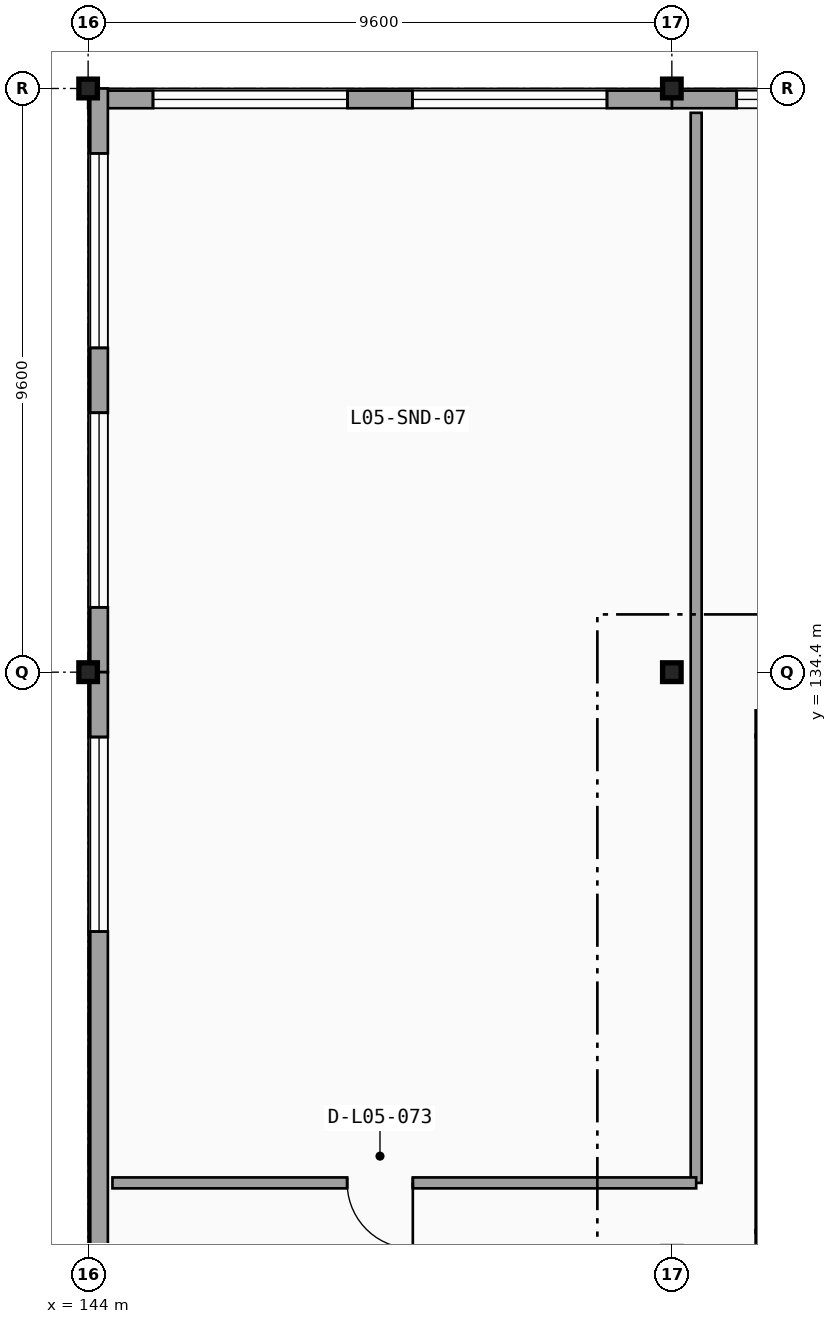
"""IFC4 building model, lengths in metres.
Left out: names, types, materials, properties, quantities, classifications, styles, units other than length and angle.
Written with IfcOpenShell. Run it as: python <this file> out.ifc"""

import sys

from ifc_helpers import new_model, si_unit, direction, frame, frame_2d, origin, origin_2d, place, context, subcontext, project, spatial, rectangle, i_section, extrude, element, fill, save


model = new_model("IFC4")
c1 = context("Model", 3, precision=1e-05, world=origin(), true_north=direction((0.0, 1.0)))
c2 = subcontext(c1, "Body", "Model", "MODEL_VIEW")
j1 = project(units=[si_unit("LENGTHUNIT", "METRE"), si_unit("PLANEANGLEUNIT", "RADIAN")], contexts=[c1])
p1 = place(None, origin())
s1 = spatial("IfcSite", under=j1, at=p1, CompositionType="ELEMENT")
p2 = place(p1, origin())
s2 = spatial("IfcBuilding", under=s1, at=p2, CompositionType="ELEMENT")
p3 = place(p2, frame((0.0, 0.0, 23.1)))
s3 = spatial("IfcBuildingStorey", under=s2, at=p3, CompositionType="ELEMENT", Elevation=23.1)
for number, where, z_axis, x_axis in (
    (1, (144.0, 134.4, 0.0), (0.0, 0.0, 1.0), (1.0, 0.0, 0.0)),
    (2, (144.0, 144.0, 0.0), (0.0, 0.0, 1.0), (1.0, 0.0, 0.0)),
    (3, (153.6, 134.4, 0.0), (0.0, 0.0, 1.0), (1.0, 0.0, 0.0)),
    (4, (153.6, 144.0, 0.0), (0.0, 0.0, 1.0), (1.0, 0.0, 0.0)),
):
    element("IfcColumn", number, at=place(p3, frame(where, z_axis=z_axis, x_axis=x_axis)), inside=s3, PredefinedType="COLUMN", context=c2, shape_type="SweptSolid", body=[
        extrude(i_section(OverallWidth=0.305, OverallDepth=0.308, WebThickness=0.01, FlangeThickness=0.015, FilletRadius=0.013, at=origin_2d()), origin(), (0.0, 0.0, 1.0), 5.1),
    ])
p4 = place(p3, frame((163.2, 143.82, 0.0), z_axis=(0.0, 0.0, 1.0), x_axis=(-1.0, 0.0, 0.0)))
e5 = element("IfcWall", 5, at=p4, inside=s3, PredefinedType="SOLIDWALL", context=c2, shape_type="SweptSolid", body=[
    extrude(rectangle(XDim=9.6, YDim=0.29, at=frame_2d((4.8, 0.0))), origin(), (0.0, 0.0, 1.0), 3.893),
])
p5 = place(p4, frame((4.267, 0.0, 0.95), z_axis=(0.0, 0.0, 1.0), x_axis=(-1.0, 0.0, 0.0)))
e6 = element("IfcOpeningElement", 6, at=p5, cuts=e5, PredefinedType="OPENING", context=c2, shape_type="SweptSolid", body=[
    extrude(rectangle(XDim=3.2, YDim=2.2, at=frame_2d((1.6, 1.1))), frame((0.0, 0.155, 0.0), z_axis=(0.0, -1.0, 0.0), x_axis=(1.0, 0.0, 0.0)), (0.0, 0.0, 1.0), 0.31),
])
p6 = place(p4, frame((8.533, 0.0, 0.95), z_axis=(0.0, 0.0, 1.0), x_axis=(-1.0, 0.0, 0.0)))
e7 = element("IfcOpeningElement", 7, at=p6, cuts=e5, PredefinedType="OPENING", context=c2, shape_type="SweptSolid", body=[
    extrude(rectangle(XDim=3.2, YDim=2.2, at=frame_2d((1.6, 1.1))), frame((0.0, 0.155, 0.0), z_axis=(0.0, -1.0, 0.0), x_axis=(1.0, 0.0, 0.0)), (0.0, 0.0, 1.0), 0.31),
])
p7 = place(p3, frame((153.6, 143.82, 0.0), z_axis=(0.0, 0.0, 1.0), x_axis=(-1.0, 0.0, 0.0)))
e8 = element("IfcWall", 8, at=p7, inside=s3, PredefinedType="SOLIDWALL", context=c2, shape_type="SweptSolid", body=[
    extrude(rectangle(XDim=9.6, YDim=0.29, at=frame_2d((4.8, 0.0))), origin(), (0.0, 0.0, 1.0), 3.906),
])
p8 = place(p7, frame((4.267, 0.0, 0.95), z_axis=(0.0, 0.0, 1.0), x_axis=(-1.0, 0.0, 0.0)))
e9 = element("IfcOpeningElement", 9, at=p8, cuts=e8, PredefinedType="OPENING", context=c2, shape_type="SweptSolid", body=[
    extrude(rectangle(XDim=3.2, YDim=2.2, at=frame_2d((1.6, 1.1))), frame((0.0, 0.155, 0.0), z_axis=(0.0, -1.0, 0.0), x_axis=(1.0, 0.0, 0.0)), (0.0, 0.0, 1.0), 0.31),
])
p9 = place(p7, frame((8.533, 0.0, 0.95), z_axis=(0.0, 0.0, 1.0), x_axis=(-1.0, 0.0, 0.0)))
e10 = element("IfcOpeningElement", 10, at=p9, cuts=e8, PredefinedType="OPENING", context=c2, shape_type="SweptSolid", body=[
    extrude(rectangle(XDim=3.2, YDim=2.2, at=frame_2d((1.6, 1.1))), frame((0.0, 0.155, 0.0), z_axis=(0.0, -1.0, 0.0), x_axis=(1.0, 0.0, 0.0)), (0.0, 0.0, 1.0), 0.31),
])
p10 = place(p3, frame((144.18, 144.0, 0.0), z_axis=(0.0, 0.0, 1.0), x_axis=(0.0, -1.0, 0.0)))
e11 = element("IfcWall", 11, at=p10, inside=s3, PredefinedType="SOLIDWALL", context=c2, shape_type="SweptSolid", body=[
    extrude(rectangle(XDim=9.6, YDim=0.29, at=frame_2d((4.8, 0.0))), origin(), (0.0, 0.0, 1.0), 3.906),
])
p11 = place(p10, frame((4.267, 0.0, 0.95), z_axis=(0.0, 0.0, 1.0), x_axis=(-1.0, 0.0, 0.0)))
e12 = element("IfcOpeningElement", 12, at=p11, cuts=e11, PredefinedType="OPENING", context=c2, shape_type="SweptSolid", body=[
    extrude(rectangle(XDim=3.2, YDim=2.2, at=frame_2d((1.6, 1.1))), frame((0.0, 0.155, 0.0), z_axis=(0.0, -1.0, 0.0), x_axis=(1.0, 0.0, 0.0)), (0.0, 0.0, 1.0), 0.31),
])
p12 = place(p10, frame((8.533, 0.0, 0.95), z_axis=(0.0, 0.0, 1.0), x_axis=(-1.0, 0.0, 0.0)))
e13 = element("IfcOpeningElement", 13, at=p12, cuts=e11, PredefinedType="OPENING", context=c2, shape_type="SweptSolid", body=[
    extrude(rectangle(XDim=3.2, YDim=2.2, at=frame_2d((1.6, 1.1))), frame((0.0, 0.155, 0.0), z_axis=(0.0, -1.0, 0.0), x_axis=(1.0, 0.0, 0.0)), (0.0, 0.0, 1.0), 0.31),
])
p13 = place(p3, frame((144.18, 134.4, 0.0), z_axis=(0.0, 0.0, 1.0), x_axis=(0.0, -1.0, 0.0)))
e14 = element("IfcWall", 14, at=p13, inside=s3, PredefinedType="SOLIDWALL", context=c2, shape_type="SweptSolid", body=[
    extrude(rectangle(XDim=9.6, YDim=0.29, at=frame_2d((4.8, 0.0))), origin(), (0.0, 0.0, 1.0), 3.906),
])
p14 = place(p13, frame((4.267, 0.0, 0.95), z_axis=(0.0, 0.0, 1.0), x_axis=(-1.0, 0.0, 0.0)))
e15 = element("IfcOpeningElement", 15, at=p14, cuts=e14, PredefinedType="OPENING", context=c2, shape_type="SweptSolid", body=[
    extrude(rectangle(XDim=3.2, YDim=2.2, at=frame_2d((1.6, 1.1))), frame((0.0, 0.155, 0.0), z_axis=(0.0, -1.0, 0.0), x_axis=(1.0, 0.0, 0.0)), (0.0, 0.0, 1.0), 0.31),
])
p15 = place(p3, frame((154.0, 143.6, 0.0), z_axis=(0.0, 0.0, 1.0), x_axis=(0.0, -1.0, 0.0)))
e16 = element("IfcWall", 16, at=p15, inside=s3, PredefinedType="PARTITIONING", context=c2, shape_type="SweptSolid", body=[
    extrude(rectangle(XDim=17.6, YDim=0.18, at=frame_2d((8.8, 0.0))), origin(), (0.0, 0.0, 1.0), 3.906),
])
p16 = place(p3, frame((154.0, 126.0, 0.0), z_axis=(0.0, 0.0, 1.0), x_axis=(-1.0, 0.0, 0.0)))
e17 = element("IfcWall", 17, at=p16, inside=s3, PredefinedType="PARTITIONING", context=c2, shape_type="SweptSolid", body=[
    extrude(rectangle(XDim=9.6, YDim=0.18, at=frame_2d((4.8, 0.0))), origin(), (0.0, 0.0, 1.0), 3.906),
])
p17 = place(p16, frame((4.66, 0.0, 0.0), z_axis=(0.0, 0.0, 1.0), x_axis=(1.0, 0.0, 0.0)))
e18 = element("IfcOpeningElement", 18, at=p17, cuts=e17, PredefinedType="OPENING", context=c2, shape_type="SweptSolid", body=[
    extrude(rectangle(XDim=1.08, YDim=2.22, at=frame_2d((0.54, 1.11))), frame((0.0, 0.1, 0.0), z_axis=(0.0, -1.0, 0.0), x_axis=(1.0, 0.0, 0.0)), (0.0, 0.0, 1.0), 0.2),
])
p18 = place(p6, origin())
e19 = element("IfcWindow", 19, at=p18, inside=s3, PartitioningType="SINGLE_PANEL", PredefinedType="WINDOW", context=c2, shape_type="SweptSolid", body=[
    extrude(rectangle(XDim=3.2, YDim=2.2, at=frame_2d((1.6, 1.1))), frame((0.0, 0.03, 0.0), z_axis=(0.0, -1.0, 0.0), x_axis=(1.0, 0.0, 0.0)), (0.0, 0.0, 1.0), 0.06),
])
fill(e7, e19)
p19 = place(p8, origin())
e20 = element("IfcWindow", 20, at=p19, inside=s3, PartitioningType="SINGLE_PANEL", PredefinedType="WINDOW", context=c2, shape_type="SweptSolid", body=[
    extrude(rectangle(XDim=3.2, YDim=2.2, at=frame_2d((1.6, 1.1))), frame((0.0, 0.03, 0.0), z_axis=(0.0, -1.0, 0.0), x_axis=(1.0, 0.0, 0.0)), (0.0, 0.0, 1.0), 0.06),
])
fill(e9, e20)
p20 = place(p9, origin())
e21 = element("IfcWindow", 21, at=p20, inside=s3, PartitioningType="SINGLE_PANEL", PredefinedType="WINDOW", context=c2, shape_type="SweptSolid", body=[
    extrude(rectangle(XDim=3.2, YDim=2.2, at=frame_2d((1.6, 1.1))), frame((0.0, 0.03, 0.0), z_axis=(0.0, -1.0, 0.0), x_axis=(1.0, 0.0, 0.0)), (0.0, 0.0, 1.0), 0.06),
])
fill(e10, e21)
p21 = place(p11, origin())
e22 = element("IfcWindow", 22, at=p21, inside=s3, PartitioningType="SINGLE_PANEL", PredefinedType="WINDOW", context=c2, shape_type="SweptSolid", body=[
    extrude(rectangle(XDim=3.2, YDim=2.2, at=frame_2d((1.6, 1.1))), frame((0.0, 0.03, 0.0), z_axis=(0.0, -1.0, 0.0), x_axis=(1.0, 0.0, 0.0)), (0.0, 0.0, 1.0), 0.06),
])
fill(e12, e22)
p22 = place(p12, origin())
e23 = element("IfcWindow", 23, at=p22, inside=s3, PartitioningType="SINGLE_PANEL", PredefinedType="WINDOW", context=c2, shape_type="SweptSolid", body=[
    extrude(rectangle(XDim=3.2, YDim=2.2, at=frame_2d((1.6, 1.1))), frame((0.0, 0.03, 0.0), z_axis=(0.0, -1.0, 0.0), x_axis=(1.0, 0.0, 0.0)), (0.0, 0.0, 1.0), 0.06),
])
fill(e13, e23)
p23 = place(p14, origin())
e24 = element("IfcWindow", 24, at=p23, inside=s3, PartitioningType="SINGLE_PANEL", PredefinedType="WINDOW", context=c2, shape_type="SweptSolid", body=[
    extrude(rectangle(XDim=3.2, YDim=2.2, at=frame_2d((1.6, 1.1))), frame((0.0, 0.03, 0.0), z_axis=(0.0, -1.0, 0.0), x_axis=(1.0, 0.0, 0.0)), (0.0, 0.0, 1.0), 0.06),
])
fill(e15, e24)
p24 = place(p17, origin())
e25 = element("IfcDoor", 25, at=p24, inside=s3, OperationType="SINGLE_SWING_LEFT", PredefinedType="DOOR", context=c2, shape_type="SweptSolid", body=[
    extrude(rectangle(XDim=1.08, YDim=2.22, at=frame_2d((0.54, 1.11))), frame((0.0, 0.025, 0.0), z_axis=(0.0, -1.0, 0.0), x_axis=(1.0, 0.0, 0.0)), (0.0, 0.0, 1.0), 0.05),
])
fill(e18, e25)
save(model, sys.argv[1])
